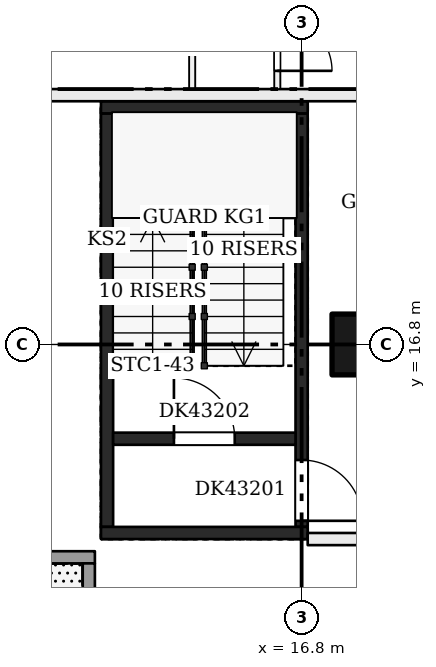
"""IFC4 building model, lengths in metres.
Left out: names, types, materials, properties, quantities, classifications, styles, units other than length and angle.
Written with IfcOpenShell. Run it as: python <this file> out.ifc"""

import sys

from ifc_helpers import new_model, si_unit, direction, frame, frame_2d, origin, origin_2d, place, context, subcontext, project, spatial, rectangle, extrude, element, fill, save


model = new_model("IFC4")
c1 = context("Model", 3, precision=1e-05, world=origin(), true_north=direction((0.0, 1.0)))
c2 = subcontext(c1, "Body", "Model", "MODEL_VIEW")
j1 = project(units=[si_unit("LENGTHUNIT", "METRE"), si_unit("PLANEANGLEUNIT", "RADIAN")], contexts=[c1])
p1 = place(None, origin())
s1 = spatial("IfcSite", under=j1, at=p1, CompositionType="ELEMENT")
p2 = place(p1, origin())
s2 = spatial("IfcBuilding", under=s1, at=p2, CompositionType="ELEMENT")
p3 = place(p2, frame((0.0, 0.0, 168.7)))
s3 = spatial("IfcBuildingStorey", under=s2, at=p3, CompositionType="ELEMENT", Elevation=168.7)
p4 = place(p3, frame((17.8, 16.8, 0.0), z_axis=(0.0, 0.0, 1.0), x_axis=(1.0, 0.0, 0.0)))
e1 = element("IfcColumn", 1, at=p4, inside=s3, PredefinedType="COLUMN", context=c2, shape_type="SweptSolid", body=[
    extrude(rectangle(XDim=1.0, YDim=1.0, at=origin_2d()), origin(), (0.0, 0.0, 1.0), 3.22),
])
p5 = place(p3, frame((13.6, 13.8, 0.0), z_axis=(0.0, 0.0, 1.0), x_axis=(0.0, 1.0, 0.0)))
e2 = element("IfcWall", 2, at=p5, inside=s3, PredefinedType="SHEAR", context=c2, shape_type="SweptSolid", body=[
    extrude(rectangle(XDim=6.8, YDim=0.2, at=frame_2d((3.4, 0.0))), origin(), (0.0, 0.0, 1.0), 3.22),
])
p6 = place(p3, frame((16.8, 13.8, 0.0), z_axis=(0.0, 0.0, 1.0), x_axis=(0.0, 1.0, 0.0)))
e3 = element("IfcWall", 3, at=p6, inside=s3, PredefinedType="SHEAR", context=c2, shape_type="SweptSolid", body=[
    extrude(rectangle(XDim=6.8, YDim=0.2, at=frame_2d((3.4, 0.0))), origin(), (0.0, 0.0, 1.0), 3.22),
])
p7 = place(p6, frame((0.1, 0.0, 0.0)))
e4 = element("IfcOpeningElement", 4, at=p7, cuts=e3, PredefinedType="OPENING", context=c2, shape_type="SweptSolid", body=[
    extrude(rectangle(XDim=1.0, YDim=2.1, at=frame_2d((0.5, 1.05))), frame((0.0, 0.11, 0.0), z_axis=(0.0, -1.0, 0.0), x_axis=(1.0, 0.0, 0.0)), (0.0, 0.0, 1.0), 0.22),
])
for number, where, z_axis, x_axis in (
    (5, (13.5, 13.7, 0.0), (0.0, 0.0, 1.0), (1.0, 0.0, 0.0)),
    (6, (13.5, 20.7, 0.0), (0.0, 0.0, 1.0), (1.0, 0.0, 0.0)),
):
    element("IfcWall", number, at=place(p3, frame(where, z_axis=z_axis, x_axis=x_axis)), inside=s3, PredefinedType="SHEAR", context=c2, shape_type="SweptSolid", body=[
        extrude(rectangle(XDim=3.4, YDim=0.2, at=frame_2d((1.7, 0.0))), origin(), (0.0, 0.0, 1.0), 3.22),
    ])
p8 = place(p3, frame((13.7, 15.25, 0.0), z_axis=(0.0, 0.0, 1.0), x_axis=(1.0, 0.0, 0.0)))
e7 = element("IfcWall", 7, at=p8, inside=s3, PredefinedType="SHEAR", context=c2, shape_type="SweptSolid", body=[
    extrude(rectangle(XDim=3.0, YDim=0.2, at=frame_2d((1.5, 0.0))), origin(), (0.0, 0.0, 1.0), 3.22),
])
p9 = place(p8, frame((1.0, 0.0, 0.0)))
e8 = element("IfcOpeningElement", 8, at=p9, cuts=e7, PredefinedType="OPENING", context=c2, shape_type="SweptSolid", body=[
    extrude(rectangle(XDim=1.0, YDim=2.1, at=frame_2d((0.5, 1.05))), frame((0.0, 0.11, 0.0), z_axis=(0.0, -1.0, 0.0), x_axis=(1.0, 0.0, 0.0)), (0.0, 0.0, 1.0), 0.22),
])
p10 = place(p3, frame((16.9, 13.6, 0.0), z_axis=(0.0, 0.0, 1.0), x_axis=(1.0, 0.0, 0.0)))
e9 = element("IfcWall", 9, at=p10, inside=s3, PredefinedType="PARTITIONING", context=c2, shape_type="SweptSolid", body=[
    extrude(rectangle(XDim=4.2, YDim=0.2, at=frame_2d((2.1, 0.0))), origin(), (0.0, 0.0, 1.0), 3.22),
])
p11 = place(p10, frame((1.6, 0.0, 0.0)))
e10 = element("IfcOpeningElement", 10, at=p11, cuts=e9, PredefinedType="OPENING", context=c2, shape_type="SweptSolid", body=[
    extrude(rectangle(XDim=1.0, YDim=2.1, at=frame_2d((0.5, 1.05))), frame((0.0, 0.11, 0.0), z_axis=(0.0, -1.0, 0.0), x_axis=(1.0, 0.0, 0.0)), (0.0, 0.0, 1.0), 0.22),
])
p12 = place(p3, frame((10.9, 20.9, 0.0), z_axis=(0.0, 0.0, 1.0), x_axis=(1.0, 0.0, 0.0)))
e11 = element("IfcWall", 11, at=p12, inside=s3, PredefinedType="PARTITIONING", context=c2, shape_type="SweptSolid", body=[
    extrude(rectangle(XDim=8.3, YDim=0.2, at=frame_2d((4.15, 0.0))), origin(), (0.0, 0.0, 1.0), 3.22),
])
p13 = place(p3, frame((15.0, 21.0, 0.0), z_axis=(0.0, 0.0, 1.0), x_axis=(0.0, 1.0, 0.0)))
e12 = element("IfcWall", 12, at=p13, inside=s3, PredefinedType="PARTITIONING", context=c2, shape_type="SweptSolid", body=[
    extrude(rectangle(XDim=19.0, YDim=0.1, at=frame_2d((9.5, 0.0))), origin(), (0.0, 0.0, 1.0), 3.22),
])
p14 = place(p13, frame((1.6, 0.0, 0.0)))
e13 = element("IfcOpeningElement", 13, at=p14, cuts=e12, PredefinedType="OPENING", context=c2, shape_type="SweptSolid", body=[
    extrude(rectangle(XDim=0.9, YDim=2.1, at=frame_2d((0.45, 1.05))), frame((0.0, 0.06, 0.0), z_axis=(0.0, -1.0, 0.0), x_axis=(1.0, 0.0, 0.0)), (0.0, 0.0, 1.0), 0.12),
])
p15 = place(p13, frame((5.8, 0.0, 0.0)))
e14 = element("IfcOpeningElement", 14, at=p15, cuts=e12, PredefinedType="OPENING", context=c2, shape_type="SweptSolid", body=[
    extrude(rectangle(XDim=0.9, YDim=2.1, at=frame_2d((0.45, 1.05))), frame((0.0, 0.06, 0.0), z_axis=(0.0, -1.0, 0.0), x_axis=(1.0, 0.0, 0.0)), (0.0, 0.0, 1.0), 0.12),
])
p16 = place(p13, frame((10.0, 0.0, 0.0)))
e15 = element("IfcOpeningElement", 15, at=p16, cuts=e12, PredefinedType="OPENING", context=c2, shape_type="SweptSolid", body=[
    extrude(rectangle(XDim=0.9, YDim=2.1, at=frame_2d((0.45, 1.05))), frame((0.0, 0.06, 0.0), z_axis=(0.0, -1.0, 0.0), x_axis=(1.0, 0.0, 0.0)), (0.0, 0.0, 1.0), 0.12),
])
p17 = place(p13, frame((15.4, 0.0, 0.0)))
e16 = element("IfcOpeningElement", 16, at=p17, cuts=e12, PredefinedType="OPENING", context=c2, shape_type="SweptSolid", body=[
    extrude(rectangle(XDim=0.9, YDim=2.1, at=frame_2d((0.45, 1.05))), frame((0.0, 0.06, 0.0), z_axis=(0.0, -1.0, 0.0), x_axis=(1.0, 0.0, 0.0)), (0.0, 0.0, 1.0), 0.12),
])
p18 = place(p3, frame((16.4, 21.0, 0.0), z_axis=(0.0, 0.0, 1.0), x_axis=(0.0, 1.0, 0.0)))
e17 = element("IfcWall", 17, at=p18, inside=s3, PredefinedType="PARTITIONING", context=c2, shape_type="SweptSolid", body=[
    extrude(rectangle(XDim=19.0, YDim=0.1, at=frame_2d((9.5, 0.0))), origin(), (0.0, 0.0, 1.0), 3.22),
])
p19 = place(p18, frame((2.6, 0.0, 0.0)))
e18 = element("IfcOpeningElement", 18, at=p19, cuts=e17, PredefinedType="OPENING", context=c2, shape_type="SweptSolid", body=[
    extrude(rectangle(XDim=0.9, YDim=2.1, at=frame_2d((0.45, 1.05))), frame((0.0, 0.06, 0.0), z_axis=(0.0, -1.0, 0.0), x_axis=(1.0, 0.0, 0.0)), (0.0, 0.0, 1.0), 0.12),
])
p20 = place(p18, frame((0.3, 0.0, 0.0)))
e19 = element("IfcOpeningElement", 19, at=p20, cuts=e17, PredefinedType="OPENING", context=c2, shape_type="SweptSolid", body=[
    extrude(rectangle(XDim=0.9, YDim=2.1, at=frame_2d((0.45, 1.05))), frame((0.0, 0.06, 0.0), z_axis=(0.0, -1.0, 0.0), x_axis=(1.0, 0.0, 0.0)), (0.0, 0.0, 1.0), 0.12),
])
p21 = place(p18, frame((6.54, 0.0, 0.0)))
e20 = element("IfcOpeningElement", 20, at=p21, cuts=e17, PredefinedType="OPENING", context=c2, shape_type="SweptSolid", body=[
    extrude(rectangle(XDim=0.9, YDim=2.1, at=frame_2d((0.45, 1.05))), frame((0.0, 0.06, 0.0), z_axis=(0.0, -1.0, 0.0), x_axis=(1.0, 0.0, 0.0)), (0.0, 0.0, 1.0), 0.12),
])
p22 = place(p18, frame((10.18, 0.0, 0.0)))
e21 = element("IfcOpeningElement", 21, at=p22, cuts=e17, PredefinedType="OPENING", context=c2, shape_type="SweptSolid", body=[
    extrude(rectangle(XDim=0.9, YDim=2.1, at=frame_2d((0.45, 1.05))), frame((0.0, 0.06, 0.0), z_axis=(0.0, -1.0, 0.0), x_axis=(1.0, 0.0, 0.0)), (0.0, 0.0, 1.0), 0.12),
])
p23 = place(p18, frame((13.82, 0.0, 0.0)))
e22 = element("IfcOpeningElement", 22, at=p23, cuts=e17, PredefinedType="OPENING", context=c2, shape_type="SweptSolid", body=[
    extrude(rectangle(XDim=0.9, YDim=2.1, at=frame_2d((0.45, 1.05))), frame((0.0, 0.06, 0.0), z_axis=(0.0, -1.0, 0.0), x_axis=(1.0, 0.0, 0.0)), (0.0, 0.0, 1.0), 0.12),
])
p24 = place(p18, frame((17.16, 0.0, 0.0)))
e23 = element("IfcOpeningElement", 23, at=p24, cuts=e17, PredefinedType="OPENING", context=c2, shape_type="SweptSolid", body=[
    extrude(rectangle(XDim=0.9, YDim=2.1, at=frame_2d((0.45, 1.05))), frame((0.0, 0.06, 0.0), z_axis=(0.0, -1.0, 0.0), x_axis=(1.0, 0.0, 0.0)), (0.0, 0.0, 1.0), 0.12),
])
p25 = place(p3, frame((10.8, 13.3, 0.0), z_axis=(0.0, 0.0, 1.0), x_axis=(1.0, 0.0, 0.0)))
e24 = element("IfcWall", 24, at=p25, inside=s3, PredefinedType="SOLIDWALL", context=c2, shape_type="SweptSolid", body=[
    extrude(rectangle(XDim=2.6, YDim=0.2, at=frame_2d((1.3, 0.0))), origin(), (0.0, 0.0, 1.0), 3.22),
])
p26 = place(p3, frame((13.3, 13.2, 0.0), z_axis=(0.0, 0.0, 1.0), x_axis=(0.0, -1.0, 0.0)))
e25 = element("IfcWall", 25, at=p26, inside=s3, PredefinedType="SOLIDWALL", context=c2, shape_type="SweptSolid", body=[
    extrude(rectangle(XDim=2.2, YDim=0.2, at=frame_2d((1.1, 0.0))), origin(), (0.0, 0.0, 1.0), 3.22),
])
p27 = place(p7, frame((1.0, 0.0, 0.0), z_axis=(0.0, 0.0, 1.0), x_axis=(-1.0, 0.0, 0.0)))
e26 = element("IfcDoor", 26, at=p27, inside=s3, OperationType="SINGLE_SWING_RIGHT", PredefinedType="DOOR", context=c2, shape_type="SweptSolid", body=[
    extrude(rectangle(XDim=1.0, YDim=2.1, at=frame_2d((0.5, 1.05))), frame((0.0, 0.025, 0.0), z_axis=(0.0, -1.0, 0.0), x_axis=(1.0, 0.0, 0.0)), (0.0, 0.0, 1.0), 0.05),
])
fill(e4, e26)
p28 = place(p9, origin())
e27 = element("IfcDoor", 27, at=p28, inside=s3, OperationType="SINGLE_SWING_LEFT", PredefinedType="DOOR", context=c2, shape_type="SweptSolid", body=[
    extrude(rectangle(XDim=1.0, YDim=2.1, at=frame_2d((0.5, 1.05))), frame((0.0, 0.025, 0.0), z_axis=(0.0, -1.0, 0.0), x_axis=(1.0, 0.0, 0.0)), (0.0, 0.0, 1.0), 0.05),
])
fill(e8, e27)
p29 = place(p20, frame((0.9, 0.0, 0.0), z_axis=(0.0, 0.0, 1.0), x_axis=(-1.0, 0.0, 0.0)))
e28 = element("IfcDoor", 28, at=p29, inside=s3, OperationType="SINGLE_SWING_RIGHT", PredefinedType="DOOR", context=c2, shape_type="SweptSolid", body=[
    extrude(rectangle(XDim=0.9, YDim=2.1, at=frame_2d((0.45, 1.05))), frame((0.0, 0.025, 0.0), z_axis=(0.0, -1.0, 0.0), x_axis=(1.0, 0.0, 0.0)), (0.0, 0.0, 1.0), 0.05),
])
fill(e19, e28)
save(model, sys.argv[1])
